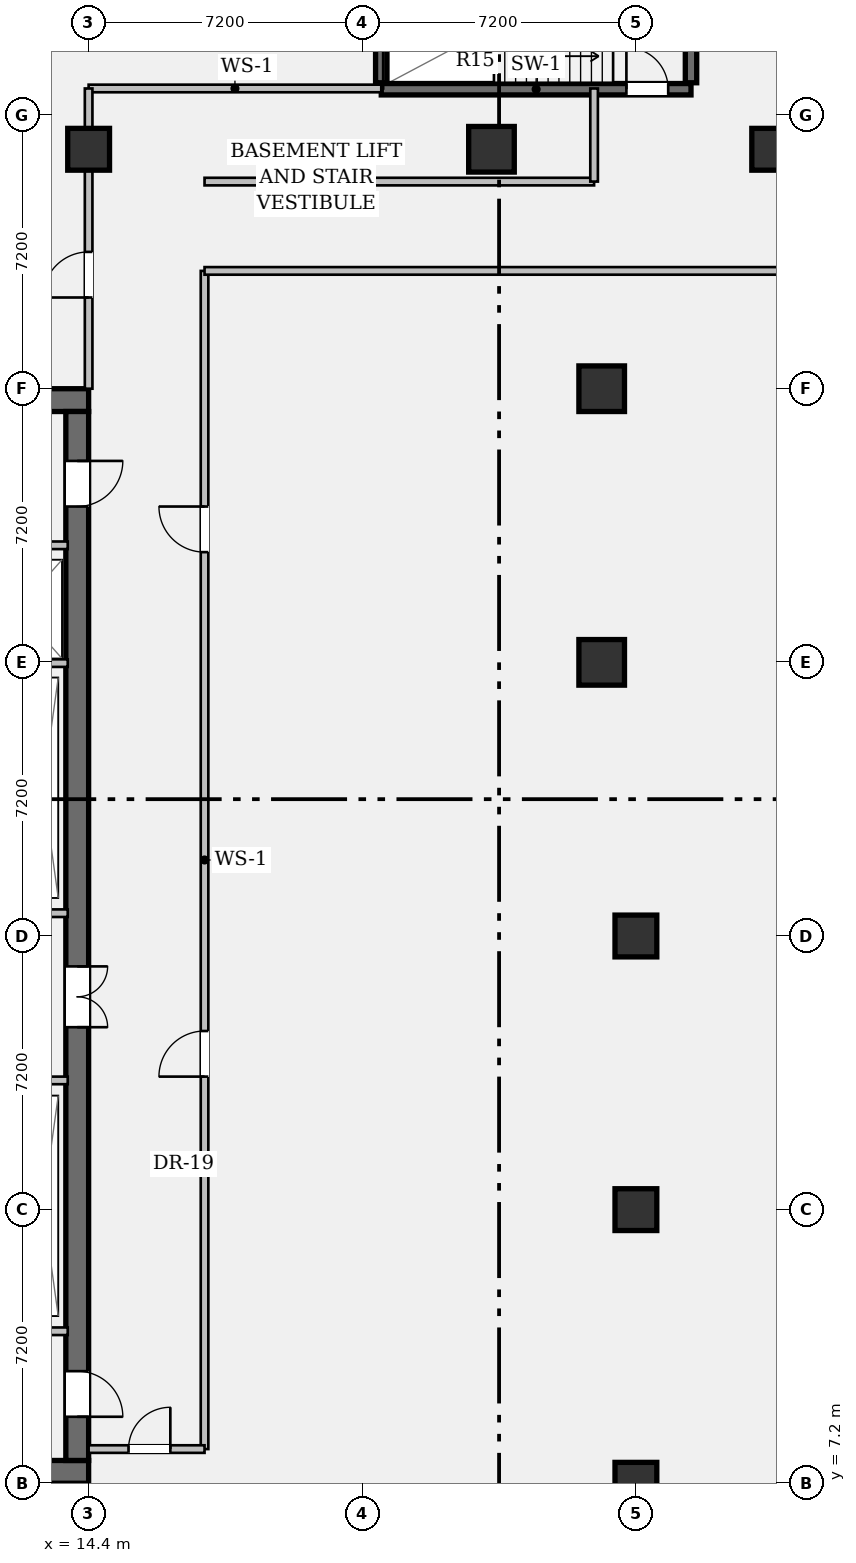
"""IFC4 building model, lengths in metres.
Left out: names, types, materials, properties, quantities, classifications, styles, units other than length and angle.
Written with IfcOpenShell. Run it as: python <this file> out.ifc"""

import sys

from ifc_helpers import new_model, si_unit, direction, frame, frame_2d, origin, origin_2d, place, context, subcontext, project, spatial, rectangle, hollow_rectangle, extrude, element, fill, save


model = new_model("IFC4")
c1 = context("Model", 3, precision=1e-05, world=origin(), true_north=direction((0.0, 1.0)))
c2 = subcontext(c1, "Body", "Model", "MODEL_VIEW")
j1 = project(units=[si_unit("LENGTHUNIT", "METRE"), si_unit("PLANEANGLEUNIT", "RADIAN")], contexts=[c1])
p1 = place(None, origin())
s1 = spatial("IfcSite", under=j1, at=p1, CompositionType="ELEMENT")
p2 = place(p1, origin())
s2 = spatial("IfcBuilding", under=s1, at=p2, CompositionType="ELEMENT")
p3 = place(p2, frame((0.0, 0.0, -4.55)))
s3 = spatial("IfcBuildingStorey", under=s2, at=p3, CompositionType="ELEMENT", Elevation=-4.55)
for number, where, z_axis, x_axis in (
    (1, (0.6, 7.5, 0.0), (0.0, 0.0, 1.0), (1.0, 0.0, 0.0)),
    (2, (0.6, 35.7, 0.0), (0.0, 0.0, 1.0), (1.0, 0.0, 0.0)),
):
    element("IfcWall", number, at=place(p3, frame(where, z_axis=z_axis, x_axis=x_axis)), inside=s3, PredefinedType="SHEAR", context=c2, shape_type="SweptSolid", body=[
        extrude(rectangle(XDim=13.8, YDim=0.6, at=frame_2d((6.9, 0.0))), origin(), (0.0, 0.0, 1.0), 4.25),
    ])
p4 = place(p3, frame((14.1, 35.4, 0.0), z_axis=(0.0, 0.0, 1.0), x_axis=(0.0, -1.0, 0.0)))
e3 = element("IfcWall", 3, at=p4, inside=s3, PredefinedType="SHEAR", context=c2, shape_type="SweptSolid", body=[
    extrude(rectangle(XDim=27.6, YDim=0.6, at=frame_2d((13.8, 0.0))), origin(), (0.0, 0.0, 1.0), 4.25),
])
p5 = place(p4, frame((1.3, 0.0, 0.0)))
e4 = element("IfcOpeningElement", 4, at=p5, cuts=e3, PredefinedType="OPENING", context=c2, shape_type="SweptSolid", body=[
    extrude(rectangle(XDim=1.2, YDim=2.15, at=frame_2d((0.6, 1.075))), frame((0.0, 0.312, 0.0), z_axis=(0.0, -1.0, 0.0), x_axis=(1.0, 0.0, 0.0)), (0.0, 0.0, 1.0), 0.624),
])
p6 = place(p4, frame((25.25, 0.0, 0.0)))
e5 = element("IfcOpeningElement", 5, at=p6, cuts=e3, PredefinedType="OPENING", context=c2, shape_type="SweptSolid", body=[
    extrude(rectangle(XDim=1.2, YDim=2.15, at=frame_2d((0.6, 1.075))), frame((0.0, 0.312, 0.0), z_axis=(0.0, -1.0, 0.0), x_axis=(1.0, 0.0, 0.0)), (0.0, 0.0, 1.0), 0.624),
])
p7 = place(p4, frame((14.6, 0.0, 0.0)))
e6 = element("IfcOpeningElement", 6, at=p7, cuts=e3, PredefinedType="OPENING", context=c2, shape_type="SweptSolid", body=[
    extrude(rectangle(XDim=1.6, YDim=2.2, at=frame_2d((0.8, 1.1))), frame((0.0, 0.312, 0.0), z_axis=(0.0, -1.0, 0.0), x_axis=(1.0, 0.0, 0.0)), (0.0, 0.0, 1.0), 0.624),
])
p8 = place(p3, frame((22.1, 43.88, 0.0), z_axis=(0.0, 0.0, 1.0), x_axis=(1.0, 0.0, 0.0)))
e7 = element("IfcWall", 7, at=p8, inside=s3, PredefinedType="SHEAR", context=c2, shape_type="SweptSolid", body=[
    extrude(rectangle(XDim=8.15, YDim=0.3, at=frame_2d((4.075, 0.0))), origin(), (0.0, 0.0, 1.0), 4.25),
])
p9 = place(p8, frame((6.45, 0.0, 0.0)))
e8 = element("IfcOpeningElement", 8, at=p9, cuts=e7, PredefinedType="OPENING", context=c2, shape_type="SweptSolid", body=[
    extrude(rectangle(XDim=1.1, YDim=2.15, at=frame_2d((0.55, 1.075))), frame((0.0, 0.162, 0.0), z_axis=(0.0, -1.0, 0.0), x_axis=(1.0, 0.0, 0.0)), (0.0, 0.0, 1.0), 0.324),
])
for number, where, z_axis, x_axis in (
    (9, (22.1, 44.05, 0.0), (0.0, 0.0, 1.0), (0.0, 1.0, 0.0)),
    (10, (30.25, 44.05, 0.0), (0.0, 0.0, 1.0), (0.0, 1.0, 0.0)),
):
    element("IfcWall", number, at=place(p3, frame(where, z_axis=z_axis, x_axis=x_axis)), inside=s3, PredefinedType="SHEAR", context=c2, shape_type="SweptSolid", body=[
        extrude(rectangle(XDim=3.05, YDim=0.3, at=frame_2d((1.525, 0.0))), origin(), (0.0, 0.0, 1.0), 4.25),
    ])
p10 = place(p3, frame((14.4, 42.3, 0.0), z_axis=(0.0, 0.0, 1.0), x_axis=(1.0, 0.0, 0.0)))
e11 = element("IfcColumn", 11, at=p10, inside=s3, PredefinedType="COLUMN", context=c2, shape_type="SweptSolid", body=[
    extrude(rectangle(XDim=1.1, YDim=1.1, at=origin_2d()), origin(), (0.0, 0.0, 1.0), 4.25),
])
for number, where, z_axis, x_axis in (
    (12, (25.0, 42.3, 0.0), (0.0, 0.0, 1.0), (1.0, 0.0, 0.0)),
    (13, (27.9, 28.8, 0.0), (0.0, 0.0, 1.0), (1.0, 0.0, 0.0)),
    (14, (27.9, 36.0, 0.0), (0.0, 0.0, 1.0), (1.0, 0.0, 0.0)),
):
    element("IfcColumn", number, at=place(p3, frame(where, z_axis=z_axis, x_axis=x_axis)), inside=s3, PredefinedType="COLUMN", context=c2, shape_type="SweptSolid", body=[
        extrude(hollow_rectangle(XDim=1.2, YDim=1.2, WallThickness=0.075, at=origin_2d()), origin(), (0.0, 0.0, 1.0), 4.25),
    ])
for number, where, z_axis, x_axis in (
    (15, (28.8, 7.2, 0.0), (0.0, 0.0, 1.0), (1.0, 0.0, 0.0)),
    (16, (28.8, 14.4, 0.0), (0.0, 0.0, 1.0), (1.0, 0.0, 0.0)),
    (17, (28.8, 21.6, 0.0), (0.0, 0.0, 1.0), (1.0, 0.0, 0.0)),
    (18, (32.4, 42.3, 0.0), (0.0, 0.0, 1.0), (1.0, 0.0, 0.0)),
):
    element("IfcColumn", number, at=place(p3, frame(where, z_axis=z_axis, x_axis=x_axis)), inside=s3, PredefinedType="COLUMN", context=c2, shape_type="SweptSolid", body=[
        extrude(rectangle(XDim=1.1, YDim=1.1, at=origin_2d()), origin(), (0.0, 0.0, 1.0), 4.25),
    ])
p11 = place(p3, frame((8.7, 31.88, 0.0), z_axis=(0.0, 0.0, 1.0), x_axis=(1.0, 0.0, 0.0)))
e19 = element("IfcWall", 19, at=p11, inside=s3, PredefinedType="PARTITIONING", context=c2, shape_type="SweptSolid", body=[
    extrude(rectangle(XDim=5.15, YDim=0.2, at=frame_2d((2.575, 0.0))), origin(), (0.0, 0.0, 1.0), 4.25),
])
p12 = place(p11, frame((0.75, 0.0, 0.0)))
e20 = element("IfcOpeningElement", 20, at=p12, cuts=e19, PredefinedType="OPENING", context=c2, shape_type="SweptSolid", body=[
    extrude(rectangle(XDim=1.2, YDim=2.2, at=frame_2d((0.6, 1.1))), frame((0.0, 0.112, 0.0), z_axis=(0.0, -1.0, 0.0), x_axis=(1.0, 0.0, 0.0)), (0.0, 0.0, 1.0), 0.224),
])
p13 = place(p11, frame((3.25, 0.0, 0.0)))
e21 = element("IfcOpeningElement", 21, at=p13, cuts=e19, PredefinedType="OPENING", context=c2, shape_type="SweptSolid", body=[
    extrude(rectangle(XDim=1.2, YDim=2.2, at=frame_2d((0.6, 1.1))), frame((0.0, 0.112, 0.0), z_axis=(0.0, -1.0, 0.0), x_axis=(1.0, 0.0, 0.0)), (0.0, 0.0, 1.0), 0.224),
])
for number, where, z_axis, x_axis in (
    (22, (8.7, 11.2, 0.0), (0.0, 0.0, 1.0), (1.0, 0.0, 0.0)),
    (23, (8.7, 28.78, 0.0), (0.0, 0.0, 1.0), (1.0, 0.0, 0.0)),
):
    element("IfcWall", number, at=place(p3, frame(where, z_axis=z_axis, x_axis=x_axis)), inside=s3, PredefinedType="PARTITIONING", context=c2, shape_type="SweptSolid", body=[
        extrude(rectangle(XDim=5.15, YDim=0.2, at=frame_2d((2.575, 0.0))), origin(), (0.0, 0.0, 1.0), 4.25),
    ])
p14 = place(p3, frame((7.1, 22.2, 0.0), z_axis=(0.0, 0.0, 1.0), x_axis=(1.0, 0.0, 0.0)))
e24 = element("IfcWall", 24, at=p14, inside=s3, PredefinedType="PARTITIONING", context=c2, shape_type="SweptSolid", body=[
    extrude(rectangle(XDim=6.75, YDim=0.2, at=frame_2d((3.375, 0.0))), origin(), (0.0, 0.0, 1.0), 4.25),
])
p15 = place(p3, frame((7.1, 17.8, 0.0), z_axis=(0.0, 0.0, 1.0), x_axis=(1.0, 0.0, 0.0)))
e25 = element("IfcWall", 25, at=p15, inside=s3, PredefinedType="PARTITIONING", context=c2, shape_type="SweptSolid", body=[
    extrude(rectangle(XDim=6.75, YDim=0.2, at=frame_2d((3.375, 0.0))), origin(), (0.0, 0.0, 1.0), 4.25),
])
p16 = place(p15, frame((2.4, 0.0, 0.0)))
e26 = element("IfcOpeningElement", 26, at=p16, cuts=e25, PredefinedType="OPENING", context=c2, shape_type="SweptSolid", body=[
    extrude(rectangle(XDim=1.0, YDim=2.15, at=frame_2d((0.5, 1.075))), frame((0.0, 0.112, 0.0), z_axis=(0.0, -1.0, 0.0), x_axis=(1.0, 0.0, 0.0)), (0.0, 0.0, 1.0), 0.224),
])
p17 = place(p3, frame((17.45, 8.1, 0.0), z_axis=(0.0, 0.0, 1.0), x_axis=(0.0, 1.0, 0.0)))
e27 = element("IfcWall", 27, at=p17, inside=s3, PredefinedType="PARTITIONING", context=c2, shape_type="SweptSolid", body=[
    extrude(rectangle(XDim=31.0, YDim=0.2, at=frame_2d((15.5, 0.0))), origin(), (0.0, 0.0, 1.0), 3.288),
])
p18 = place(p17, frame((9.8, 0.0, 0.0)))
e28 = element("IfcOpeningElement", 28, at=p18, cuts=e27, PredefinedType="OPENING", context=c2, shape_type="SweptSolid", body=[
    extrude(rectangle(XDim=1.2, YDim=2.15, at=frame_2d((0.6, 1.075))), frame((0.0, 0.112, 0.0), z_axis=(0.0, -1.0, 0.0), x_axis=(1.0, 0.0, 0.0)), (0.0, 0.0, 1.0), 0.224),
])
p19 = place(p17, frame((23.6, 0.0, 0.0)))
e29 = element("IfcOpeningElement", 29, at=p19, cuts=e27, PredefinedType="OPENING", context=c2, shape_type="SweptSolid", body=[
    extrude(rectangle(XDim=1.2, YDim=2.15, at=frame_2d((0.6, 1.075))), frame((0.0, 0.112, 0.0), z_axis=(0.0, -1.0, 0.0), x_axis=(1.0, 0.0, 0.0)), (0.0, 0.0, 1.0), 0.224),
])
p20 = place(p3, frame((14.4, 8.1, 0.0), z_axis=(0.0, 0.0, 1.0), x_axis=(1.0, 0.0, 0.0)))
e30 = element("IfcWall", 30, at=p20, inside=s3, PredefinedType="PARTITIONING", context=c2, shape_type="SweptSolid", body=[
    extrude(rectangle(XDim=3.05, YDim=0.2, at=frame_2d((1.525, 0.0))), origin(), (0.0, 0.0, 1.0), 3.288),
])
p21 = place(p20, frame((1.05, 0.0, 0.0)))
e31 = element("IfcOpeningElement", 31, at=p21, cuts=e30, PredefinedType="OPENING", context=c2, shape_type="SweptSolid", body=[
    extrude(rectangle(XDim=1.1, YDim=2.15, at=frame_2d((0.55, 1.075))), frame((0.0, 0.112, 0.0), z_axis=(0.0, -1.0, 0.0), x_axis=(1.0, 0.0, 0.0)), (0.0, 0.0, 1.0), 0.224),
])
p22 = place(p3, frame((14.4, 43.9, 0.0), z_axis=(0.0, 0.0, 1.0), x_axis=(1.0, 0.0, 0.0)))
e32 = element("IfcWall", 32, at=p22, inside=s3, PredefinedType="PARTITIONING", context=c2, shape_type="SweptSolid", body=[
    extrude(rectangle(XDim=7.7, YDim=0.2, at=frame_2d((3.85, 0.0))), origin(), (0.0, 0.0, 1.0), 3.288),
])
p23 = place(p3, frame((17.45, 41.45, 0.0), z_axis=(0.0, 0.0, 1.0), x_axis=(1.0, 0.0, 0.0)))
e33 = element("IfcWall", 33, at=p23, inside=s3, PredefinedType="PARTITIONING", context=c2, shape_type="SweptSolid", body=[
    extrude(rectangle(XDim=10.25, YDim=0.2, at=frame_2d((5.125, 0.0))), origin(), (0.0, 0.0, 1.0), 3.686),
])
p24 = place(p3, frame((17.45, 39.1, 0.0), z_axis=(0.0, 0.0, 1.0), x_axis=(1.0, 0.0, 0.0)))
e34 = element("IfcWall", 34, at=p24, inside=s3, PredefinedType="PARTITIONING", context=c2, shape_type="SweptSolid", body=[
    extrude(rectangle(XDim=32.7, YDim=0.2, at=frame_2d((16.35, 0.0))), origin(), (0.0, 0.0, 1.0), 3.288),
])
p25 = place(p3, frame((27.7, 41.45, 0.0), z_axis=(0.0, 0.0, 1.0), x_axis=(0.0, 1.0, 0.0)))
e35 = element("IfcWall", 35, at=p25, inside=s3, PredefinedType="PARTITIONING", context=c2, shape_type="SweptSolid", body=[
    extrude(rectangle(XDim=2.45, YDim=0.2, at=frame_2d((1.225, 0.0))), origin(), (0.0, 0.0, 1.0), 3.288),
])
p26 = place(p3, frame((14.4, 36.0, 0.0), z_axis=(0.0, 0.0, 1.0), x_axis=(0.0, 1.0, 0.0)))
e36 = element("IfcWall", 36, at=p26, inside=s3, PredefinedType="PARTITIONING", context=c2, shape_type="SweptSolid", body=[
    extrude(rectangle(XDim=7.9, YDim=0.2, at=frame_2d((3.95, 0.0))), origin(), (0.0, 0.0, 1.0), 3.288),
])
p27 = place(p26, frame((2.4, 0.0, 0.0)))
e37 = element("IfcOpeningElement", 37, at=p27, cuts=e36, PredefinedType="OPENING", context=c2, shape_type="SweptSolid", body=[
    extrude(rectangle(XDim=1.2, YDim=2.15, at=frame_2d((0.6, 1.075))), frame((0.0, 0.112, 0.0), z_axis=(0.0, -1.0, 0.0), x_axis=(1.0, 0.0, 0.0)), (0.0, 0.0, 1.0), 0.224),
])
p28 = place(p5, origin())
e38 = element("IfcDoor", 38, at=p28, inside=s3, OperationType="SINGLE_SWING_LEFT", PredefinedType="DOOR", context=c2, shape_type="SweptSolid", body=[
    extrude(rectangle(XDim=1.2, YDim=2.15, at=frame_2d((0.6, 1.075))), frame((0.0, 0.025, 0.0), z_axis=(0.0, -1.0, 0.0), x_axis=(1.0, 0.0, 0.0)), (0.0, 0.0, 1.0), 0.05),
])
fill(e4, e38)
p29 = place(p6, origin())
e39 = element("IfcDoor", 39, at=p29, inside=s3, OperationType="SINGLE_SWING_RIGHT", PredefinedType="DOOR", context=c2, shape_type="SweptSolid", body=[
    extrude(rectangle(XDim=1.2, YDim=2.15, at=frame_2d((0.6, 1.075))), frame((0.0, 0.025, 0.0), z_axis=(0.0, -1.0, 0.0), x_axis=(1.0, 0.0, 0.0)), (0.0, 0.0, 1.0), 0.05),
])
fill(e5, e39)
p30 = place(p7, origin())
e40 = element("IfcDoor", 40, at=p30, inside=s3, OperationType="DOUBLE_DOOR_SINGLE_SWING", PredefinedType="DOOR", context=c2, shape_type="SweptSolid", body=[
    extrude(rectangle(XDim=1.6, YDim=2.2, at=frame_2d((0.8, 1.1))), frame((0.0, 0.025, 0.0), z_axis=(0.0, -1.0, 0.0), x_axis=(1.0, 0.0, 0.0)), (0.0, 0.0, 1.0), 0.05),
])
fill(e6, e40)
p31 = place(p9, origin())
e41 = element("IfcDoor", 41, at=p31, inside=s3, OperationType="SINGLE_SWING_LEFT", PredefinedType="DOOR", context=c2, shape_type="SweptSolid", body=[
    extrude(rectangle(XDim=1.1, YDim=2.15, at=frame_2d((0.55, 1.075))), frame((0.0, 0.025, 0.0), z_axis=(0.0, -1.0, 0.0), x_axis=(1.0, 0.0, 0.0)), (0.0, 0.0, 1.0), 0.05),
])
fill(e8, e41)
p32 = place(p27, origin())
e42 = element("IfcDoor", 42, at=p32, inside=s3, OperationType="SINGLE_SWING_LEFT", PredefinedType="DOOR", context=c2, shape_type="SweptSolid", body=[
    extrude(rectangle(XDim=1.2, YDim=2.15, at=frame_2d((0.6, 1.075))), frame((0.0, 0.025, 0.0), z_axis=(0.0, -1.0, 0.0), x_axis=(1.0, 0.0, 0.0)), (0.0, 0.0, 1.0), 0.05),
])
fill(e37, e42)
p33 = place(p21, origin())
e43 = element("IfcDoor", 43, at=p33, inside=s3, OperationType="SINGLE_SWING_RIGHT", PredefinedType="DOOR", context=c2, shape_type="SweptSolid", body=[
    extrude(rectangle(XDim=1.1, YDim=2.15, at=frame_2d((0.55, 1.075))), frame((0.0, 0.025, 0.0), z_axis=(0.0, -1.0, 0.0), x_axis=(1.0, 0.0, 0.0)), (0.0, 0.0, 1.0), 0.05),
])
fill(e31, e43)
p34 = place(p18, origin())
e44 = element("IfcDoor", 44, at=p34, inside=s3, OperationType="SINGLE_SWING_LEFT", PredefinedType="DOOR", context=c2, shape_type="SweptSolid", body=[
    extrude(rectangle(XDim=1.2, YDim=2.15, at=frame_2d((0.6, 1.075))), frame((0.0, 0.025, 0.0), z_axis=(0.0, -1.0, 0.0), x_axis=(1.0, 0.0, 0.0)), (0.0, 0.0, 1.0), 0.05),
])
fill(e28, e44)
p35 = place(p19, origin())
e45 = element("IfcDoor", 45, at=p35, inside=s3, OperationType="SINGLE_SWING_RIGHT", PredefinedType="DOOR", context=c2, shape_type="SweptSolid", body=[
    extrude(rectangle(XDim=1.2, YDim=2.15, at=frame_2d((0.6, 1.075))), frame((0.0, 0.025, 0.0), z_axis=(0.0, -1.0, 0.0), x_axis=(1.0, 0.0, 0.0)), (0.0, 0.0, 1.0), 0.05),
])
fill(e29, e45)
save(model, sys.argv[1])
